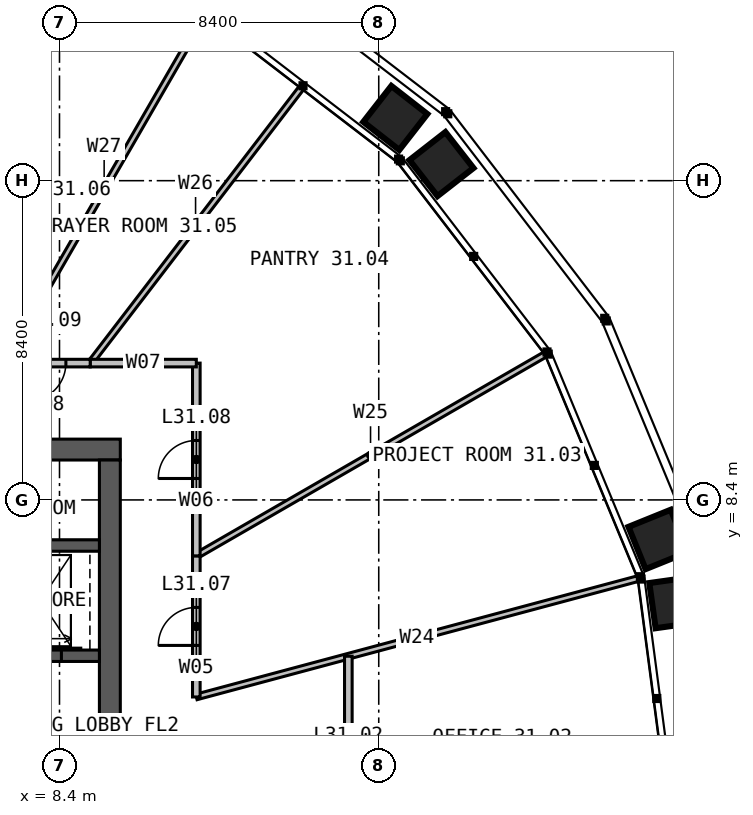
"""IFC4 building model, lengths in metres.
Left out: names, types, materials, properties, quantities, classifications, styles, units other than length and angle.
Written with IfcOpenShell. Run it as: python <this file> out.ifc"""

import sys

from ifc_helpers import new_model, si_unit, direction, frame, frame_2d, origin, place, context, subcontext, project, spatial, rectangle, extrude, element, fill, save


model = new_model("IFC4")
c1 = context("Model", 3, precision=1e-05, world=origin(), true_north=direction((0.0, 1.0)))
c2 = subcontext(c1, "Body", "Model", "MODEL_VIEW")
j1 = project(units=[si_unit("LENGTHUNIT", "METRE"), si_unit("PLANEANGLEUNIT", "RADIAN")], contexts=[c1])
p1 = place(None, origin())
s1 = spatial("IfcSite", under=j1, at=p1, CompositionType="ELEMENT")
p2 = place(p1, origin())
s2 = spatial("IfcBuilding", under=s1, at=p2, CompositionType="ELEMENT")
p3 = place(p2, frame((0.0, 0.0, 130.0)))
s3 = spatial("IfcBuildingStorey", under=s2, at=p3, CompositionType="ELEMENT", Elevation=130.0)
p4 = place(p3, frame((-10.0, 9.725, 0.0), z_axis=(0.0, 0.0, 1.0), x_axis=(1.0, 0.0, 0.0)))
e1 = element("IfcWall", 1, at=p4, inside=s3, PredefinedType="SOLIDWALL", context=c2, shape_type="SweptSolid", body=[
    extrude(rectangle(XDim=20.0, YDim=0.55, at=frame_2d((10.0, 0.0))), origin(), (0.0, 0.0, 1.0), 4.0),
])
p5 = place(p4, frame((9.4, 0.0, 0.0)))
e2 = element("IfcOpeningElement", 2, at=p5, cuts=e1, PredefinedType="OPENING", context=c2, shape_type="SweptSolid", body=[
    extrude(rectangle(XDim=1.2, YDim=2.2, at=frame_2d((0.6, 1.1))), frame((0.0, 0.285, 0.0), z_axis=(0.0, -1.0, 0.0), x_axis=(1.0, 0.0, 0.0)), (0.0, 0.0, 1.0), 0.57),
])
p6 = place(p3, frame((9.725, -9.45, 0.0), z_axis=(0.0, 0.0, 1.0), x_axis=(0.0, 1.0, 0.0)))
e3 = element("IfcWall", 3, at=p6, inside=s3, PredefinedType="SOLIDWALL", context=c2, shape_type="SweptSolid", body=[
    extrude(rectangle(XDim=18.9, YDim=0.55, at=frame_2d((9.45, 0.0))), origin(), (0.0, 0.0, 1.0), 4.0),
])
p7 = place(p3, frame((6.6, 4.3, 0.0), z_axis=(0.0, 0.0, 1.0), x_axis=(1.0, 0.0, 0.0)))
e4 = element("IfcWall", 4, at=p7, inside=s3, PredefinedType="SOLIDWALL", context=c2, shape_type="SweptSolid", body=[
    extrude(rectangle(XDim=2.85, YDim=0.3, at=frame_2d((1.425, 0.0))), origin(), (0.0, 0.0, 1.0), 4.0),
])
p8 = place(p7, frame((0.75, 0.0, 0.0)))
e5 = element("IfcOpeningElement", 5, at=p8, cuts=e4, PredefinedType="OPENING", context=c2, shape_type="SweptSolid", body=[
    extrude(rectangle(XDim=1.1, YDim=2.2, at=frame_2d((0.55, 1.1))), frame((0.0, 0.16, 0.0), z_axis=(0.0, -1.0, 0.0), x_axis=(1.0, 0.0, 0.0)), (0.0, 0.0, 1.0), 0.32),
])
p9 = place(p3, frame((6.6, 7.2, 0.0), z_axis=(0.0, 0.0, 1.0), x_axis=(1.0, 0.0, 0.0)))
e6 = element("IfcWall", 6, at=p9, inside=s3, PredefinedType="SOLIDWALL", context=c2, shape_type="SweptSolid", body=[
    extrude(rectangle(XDim=2.85, YDim=0.3, at=frame_2d((1.425, 0.0))), origin(), (0.0, 0.0, 1.0), 4.0),
])
p10 = place(p3, frame((12.0, 3.215, 0.0), z_axis=(0.0, 0.0, 1.0), x_axis=(0.965923753467, 0.258826780857, 0.0)))
e7 = element("IfcWall", 7, at=p10, inside=s3, PredefinedType="PARTITIONING", context=c2, shape_type="SweptSolid", body=[
    extrude(rectangle(XDim=12.02, YDim=0.15, at=frame_2d((6.01, 0.0))), origin(), (0.0, 0.0, 1.0), 2.79),
])
p11 = place(p3, frame((12.0, 6.928, 0.0), z_axis=(0.0, 0.0, 1.0), x_axis=(0.866023526577, 0.500003251404, 0.0)))
e8 = element("IfcWall", 8, at=p11, inside=s3, PredefinedType="PARTITIONING", context=c2, shape_type="SweptSolid", body=[
    extrude(rectangle(XDim=10.587, YDim=0.15, at=frame_2d((5.293, 0.0))), origin(), (0.0, 0.0, 1.0), 2.79),
])
p12 = place(p3, frame((9.208, 12.0, 0.0), z_axis=(0.0, 0.0, 1.0), x_axis=(0.608742676865, 0.793367728965, 0.0)))
e9 = element("IfcWall", 9, at=p12, inside=s3, PredefinedType="PARTITIONING", context=c2, shape_type="SweptSolid", body=[
    extrude(rectangle(XDim=9.108, YDim=0.15, at=frame_2d((4.554, 0.0))), origin(), (0.0, 0.0, 1.0), 2.79),
])
p13 = place(p3, frame((6.928, 12.0, 0.0), z_axis=(0.0, 0.0, 1.0), x_axis=(0.500003251404, 0.866023526577, 0.0)))
e10 = element("IfcWall", 10, at=p13, inside=s3, PredefinedType="PARTITIONING", context=c2, shape_type="SweptSolid", body=[
    extrude(rectangle(XDim=10.587, YDim=0.15, at=frame_2d((5.293, 0.0))), origin(), (0.0, 0.0, 1.0), 2.79),
])
p14 = place(p3, frame((16.0, -9.238, 0.0), z_axis=(0.0, 0.0, 1.0), x_axis=(0.0, 1.0, 0.0)))
e11 = element("IfcWall", 11, at=p14, inside=s3, PredefinedType="PARTITIONING", context=c2, shape_type="SweptSolid", body=[
    extrude(rectangle(XDim=13.525, YDim=0.2, at=frame_2d((6.762, 0.0))), origin(), (0.0, 0.0, 1.0), 3.8),
])
p15 = place(p14, frame((3.066, 0.0, 0.0)))
e12 = element("IfcOpeningElement", 12, at=p15, cuts=e11, PredefinedType="OPENING", context=c2, shape_type="SweptSolid", body=[
    extrude(rectangle(XDim=1.0, YDim=2.2, at=frame_2d((0.5, 1.1))), frame((0.0, 0.11, 0.0), z_axis=(0.0, -1.0, 0.0), x_axis=(1.0, 0.0, 0.0)), (0.0, 0.0, 1.0), 0.22),
])
p16 = place(p14, frame((9.828, 0.0, 0.0)))
e13 = element("IfcOpeningElement", 13, at=p16, cuts=e11, PredefinedType="OPENING", context=c2, shape_type="SweptSolid", body=[
    extrude(rectangle(XDim=1.0, YDim=2.2, at=frame_2d((0.5, 1.1))), frame((0.0, 0.11, 0.0), z_axis=(0.0, -1.0, 0.0), x_axis=(1.0, 0.0, 0.0)), (0.0, 0.0, 1.0), 0.22),
])
p17 = place(p3, frame((12.0, 3.215, 0.0), z_axis=(0.0, 0.0, 1.0), x_axis=(0.0, 1.0, 0.0)))
e14 = element("IfcWall", 14, at=p17, inside=s3, PredefinedType="PARTITIONING", context=c2, shape_type="SweptSolid", body=[
    extrude(rectangle(XDim=3.713, YDim=0.2, at=frame_2d((1.856, 0.0))), origin(), (0.0, 0.0, 1.0), 3.8),
])
p18 = place(p17, frame((1.356, 0.0, 0.0)))
e15 = element("IfcOpeningElement", 15, at=p18, cuts=e14, PredefinedType="OPENING", context=c2, shape_type="SweptSolid", body=[
    extrude(rectangle(XDim=1.0, YDim=2.2, at=frame_2d((0.5, 1.1))), frame((0.0, 0.11, 0.0), z_axis=(0.0, -1.0, 0.0), x_axis=(1.0, 0.0, 0.0)), (0.0, 0.0, 1.0), 0.22),
])
p19 = place(p3, frame((12.0, 6.928, 0.0), z_axis=(0.0, 0.0, 1.0), x_axis=(0.0, 1.0, 0.0)))
e16 = element("IfcWall", 16, at=p19, inside=s3, PredefinedType="PARTITIONING", context=c2, shape_type="SweptSolid", body=[
    extrude(rectangle(XDim=5.072, YDim=0.2, at=frame_2d((2.536, 0.0))), origin(), (0.0, 0.0, 1.0), 3.8),
])
p20 = place(p19, frame((2.036, 0.0, 0.0)))
e17 = element("IfcOpeningElement", 17, at=p20, cuts=e16, PredefinedType="OPENING", context=c2, shape_type="SweptSolid", body=[
    extrude(rectangle(XDim=1.0, YDim=2.2, at=frame_2d((0.5, 1.1))), frame((0.0, 0.11, 0.0), z_axis=(0.0, -1.0, 0.0), x_axis=(1.0, 0.0, 0.0)), (0.0, 0.0, 1.0), 0.22),
])
p21 = place(p3, frame((12.0, 12.0, 0.0), z_axis=(0.0, 0.0, 1.0), x_axis=(-1.0, 0.0, 0.0)))
e18 = element("IfcWall", 18, at=p21, inside=s3, PredefinedType="PARTITIONING", context=c2, shape_type="SweptSolid", body=[
    extrude(rectangle(XDim=2.792, YDim=0.2, at=frame_2d((1.396, 0.0))), origin(), (0.0, 0.0, 1.0), 3.8),
])
p22 = place(p3, frame((9.208, 12.0, 0.0), z_axis=(0.0, 0.0, 1.0), x_axis=(-1.0, 0.0, 0.0)))
e19 = element("IfcWall", 19, at=p22, inside=s3, PredefinedType="PARTITIONING", context=c2, shape_type="SweptSolid", body=[
    extrude(rectangle(XDim=2.28, YDim=0.2, at=frame_2d((1.14, 0.0))), origin(), (0.0, 0.0, 1.0), 3.8),
])
p23 = place(p22, frame((0.64, 0.0, 0.0)))
e20 = element("IfcOpeningElement", 20, at=p23, cuts=e19, PredefinedType="OPENING", context=c2, shape_type="SweptSolid", body=[
    extrude(rectangle(XDim=1.0, YDim=2.2, at=frame_2d((0.5, 1.1))), frame((0.0, 0.11, 0.0), z_axis=(0.0, -1.0, 0.0), x_axis=(1.0, 0.0, 0.0)), (0.0, 0.0, 1.0), 0.22),
])
p24 = place(p8, origin())
e21 = element("IfcDoor", 21, at=p24, inside=s3, OperationType="SLIDING_TO_LEFT", PredefinedType="DOOR", context=c2, shape_type="SweptSolid", body=[
    extrude(rectangle(XDim=1.1, YDim=2.2, at=frame_2d((0.55, 1.1))), frame((0.0, 0.025, 0.0), z_axis=(0.0, -1.0, 0.0), x_axis=(1.0, 0.0, 0.0)), (0.0, 0.0, 1.0), 0.05),
])
fill(e5, e21)
p25 = place(p18, origin())
e22 = element("IfcDoor", 22, at=p25, inside=s3, OperationType="SINGLE_SWING_LEFT", PredefinedType="DOOR", context=c2, shape_type="SweptSolid", body=[
    extrude(rectangle(XDim=1.0, YDim=2.2, at=frame_2d((0.5, 1.1))), frame((0.0, 0.025, 0.0), z_axis=(0.0, -1.0, 0.0), x_axis=(1.0, 0.0, 0.0)), (0.0, 0.0, 1.0), 0.05),
])
fill(e15, e22)
p26 = place(p20, origin())
e23 = element("IfcDoor", 23, at=p26, inside=s3, OperationType="SINGLE_SWING_LEFT", PredefinedType="DOOR", context=c2, shape_type="SweptSolid", body=[
    extrude(rectangle(XDim=1.0, YDim=2.2, at=frame_2d((0.5, 1.1))), frame((0.0, 0.025, 0.0), z_axis=(0.0, -1.0, 0.0), x_axis=(1.0, 0.0, 0.0)), (0.0, 0.0, 1.0), 0.05),
])
fill(e17, e23)
p27 = place(p23, origin())
e24 = element("IfcDoor", 24, at=p27, inside=s3, OperationType="SINGLE_SWING_RIGHT", PredefinedType="DOOR", context=c2, shape_type="SweptSolid", body=[
    extrude(rectangle(XDim=1.0, YDim=2.2, at=frame_2d((0.5, 1.1))), frame((0.0, 0.025, 0.0), z_axis=(0.0, -1.0, 0.0), x_axis=(1.0, 0.0, 0.0)), (0.0, 0.0, 1.0), 0.05),
])
fill(e20, e24)
save(model, sys.argv[1])
